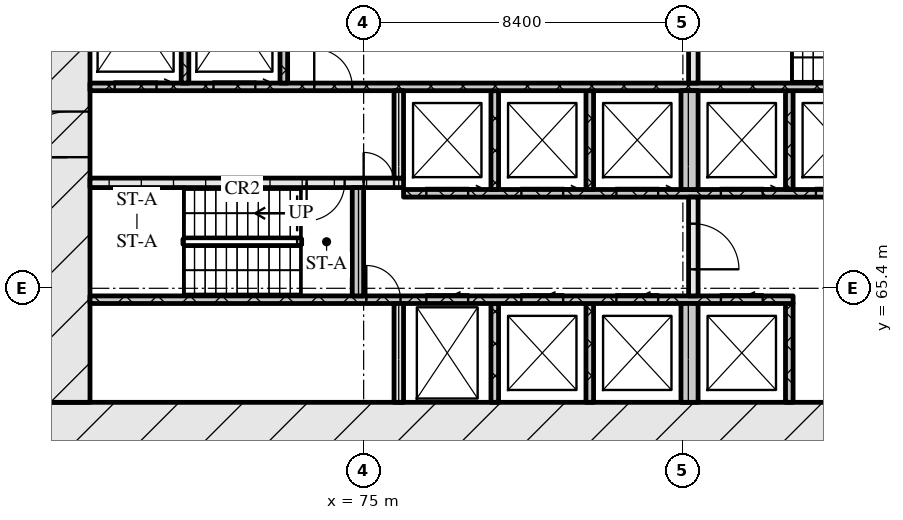
"""IFC4 building model, lengths in metres.
Left out: names, types, materials, properties, quantities, classifications, styles, units other than length and angle.
Written with IfcOpenShell. Run it as: python <this file> out.ifc"""

import sys

from ifc_helpers import new_model, si_unit, direction, frame, frame_2d, origin, place, context, subcontext, project, spatial, rectangle, extrude, element, fill, save


model = new_model("IFC4")
c1 = context("Model", 3, precision=1e-05, world=origin(), true_north=direction((0.0, 1.0)))
c2 = subcontext(c1, "Body", "Model", "MODEL_VIEW")
j1 = project(units=[si_unit("LENGTHUNIT", "METRE"), si_unit("PLANEANGLEUNIT", "RADIAN")], contexts=[c1])
p1 = place(None, origin())
s1 = spatial("IfcSite", under=j1, at=p1, CompositionType="ELEMENT")
p2 = place(p1, origin())
s2 = spatial("IfcBuilding", under=s1, at=p2, CompositionType="ELEMENT")
p3 = place(p2, origin())
s3 = spatial("IfcBuildingStorey", under=s2, at=p3, CompositionType="ELEMENT", Elevation=0.0)
p4 = place(p3, frame((66.6, 61.8, 0.0), z_axis=(0.0, 0.0, 1.0), x_axis=(1.0, 0.0, 0.0)))
e1 = element("IfcWall", 1, at=p4, inside=s3, PredefinedType="SOLIDWALL", context=c2, shape_type="SweptSolid", body=[
    extrude(rectangle(XDim=42.0, YDim=1.2, at=frame_2d((21.0, 0.0))), origin(), (0.0, 0.0, 1.0), 8.7),
])
p5 = place(p4, frame((21.35, 0.0, 0.0)))
e2 = element("IfcOpeningElement", 2, at=p5, cuts=e1, PredefinedType="OPENING", context=c2, shape_type="SweptSolid", body=[
    extrude(rectangle(XDim=1.8, YDim=2.1, at=frame_2d((0.9, 1.05))), frame((0.0, 0.61, 0.0), z_axis=(0.0, -1.0, 0.0), x_axis=(1.0, 0.0, 0.0)), (0.0, 0.0, 1.0), 1.22),
])
p6 = place(p3, frame((67.2, 62.4, 0.0), z_axis=(0.0, 0.0, 1.0), x_axis=(0.0, 1.0, 0.0)))
e3 = element("IfcWall", 3, at=p6, inside=s3, PredefinedType="SOLIDWALL", context=c2, shape_type="SweptSolid", body=[
    extrude(rectangle(XDim=12.0, YDim=1.2, at=frame_2d((6.0, 0.0))), origin(), (0.0, 0.0, 1.0), 8.7),
])
p7 = place(p6, frame((6.45, 0.0, 0.0)))
e4 = element("IfcOpeningElement", 4, at=p7, cuts=e3, PredefinedType="OPENING", context=c2, shape_type="SweptSolid", body=[
    extrude(rectangle(XDim=1.2, YDim=2.1, at=frame_2d((0.6, 1.05))), frame((0.0, 0.61, 0.0), z_axis=(0.0, -1.0, 0.0), x_axis=(1.0, 0.0, 0.0)), (0.0, 0.0, 1.0), 1.22),
])
p8 = place(p3, frame((75.925, 62.4, 0.0), z_axis=(0.0, 0.0, 1.0), x_axis=(0.0, 1.0, 0.0)))
e5 = element("IfcWall", 5, at=p8, inside=s3, PredefinedType="SOLIDWALL", context=c2, shape_type="SweptSolid", body=[
    extrude(rectangle(XDim=2.6, YDim=0.25, at=frame_2d((1.3, 0.0))), origin(), (0.0, 0.0, 1.0), 8.7),
])
for number, where, z_axis, x_axis in (
    (6, (78.45, 62.4, 0.0), (0.0, 0.0, 1.0), (0.0, 1.0, 0.0)),
    (7, (80.95, 62.4, 0.0), (0.0, 0.0, 1.0), (0.0, 1.0, 0.0)),
):
    element("IfcWall", number, at=place(p3, frame(where, z_axis=z_axis, x_axis=x_axis)), inside=s3, PredefinedType="SOLIDWALL", context=c2, shape_type="SweptSolid", body=[
        extrude(rectangle(XDim=2.6, YDim=0.2, at=frame_2d((1.3, 0.0))), origin(), (0.0, 0.0, 1.0), 8.7),
    ])
p9 = place(p3, frame((83.575, 62.4, 0.0), z_axis=(0.0, 0.0, 1.0), x_axis=(0.0, 1.0, 0.0)))
e8 = element("IfcWall", 8, at=p9, inside=s3, PredefinedType="SOLIDWALL", context=c2, shape_type="SweptSolid", body=[
    extrude(rectangle(XDim=2.6, YDim=0.45, at=frame_2d((1.3, 0.0))), origin(), (0.0, 0.0, 1.0), 8.7),
])
p10 = place(p3, frame((86.2, 62.4, 0.0), z_axis=(0.0, 0.0, 1.0), x_axis=(0.0, 1.0, 0.0)))
e9 = element("IfcWall", 9, at=p10, inside=s3, PredefinedType="SOLIDWALL", context=c2, shape_type="SweptSolid", body=[
    extrude(rectangle(XDim=2.6, YDim=0.2, at=frame_2d((1.3, 0.0))), origin(), (0.0, 0.0, 1.0), 8.7),
])
p11 = place(p3, frame((67.8, 65.1, 0.0), z_axis=(0.0, 0.0, 1.0), x_axis=(1.0, 0.0, 0.0)))
e10 = element("IfcWall", 10, at=p11, inside=s3, PredefinedType="SOLIDWALL", context=c2, shape_type="SweptSolid", body=[
    extrude(rectangle(XDim=18.5, YDim=0.2, at=frame_2d((9.25, 0.0))), origin(), (0.0, 0.0, 1.0), 8.7),
])
p12 = place(p11, frame((7.27, 0.0, 0.0)))
e11 = element("IfcOpeningElement", 11, at=p12, cuts=e10, PredefinedType="OPENING", context=c2, shape_type="SweptSolid", body=[
    extrude(rectangle(XDim=0.9, YDim=2.1, at=frame_2d((0.45, 1.05))), frame((0.0, 0.11, 0.0), z_axis=(0.0, -1.0, 0.0), x_axis=(1.0, 0.0, 0.0)), (0.0, 0.0, 1.0), 0.22),
])
p13 = place(p11, frame((8.85, 0.0, 0.0)))
e12 = element("IfcOpeningElement", 12, at=p13, cuts=e10, PredefinedType="OPENING", context=c2, shape_type="SweptSolid", body=[
    extrude(rectangle(XDim=1.1, YDim=2.1, at=frame_2d((0.55, 1.05))), frame((0.0, 0.11, 0.0), z_axis=(0.0, -1.0, 0.0), x_axis=(1.0, 0.0, 0.0)), (0.0, 0.0, 1.0), 0.22),
])
p14 = place(p11, frame((11.35, 0.0, 0.0)))
e13 = element("IfcOpeningElement", 13, at=p14, cuts=e10, PredefinedType="OPENING", context=c2, shape_type="SweptSolid", body=[
    extrude(rectangle(XDim=1.1, YDim=2.1, at=frame_2d((0.55, 1.05))), frame((0.0, 0.11, 0.0), z_axis=(0.0, -1.0, 0.0), x_axis=(1.0, 0.0, 0.0)), (0.0, 0.0, 1.0), 0.22),
])
p15 = place(p11, frame((13.85, 0.0, 0.0)))
e14 = element("IfcOpeningElement", 14, at=p15, cuts=e10, PredefinedType="OPENING", context=c2, shape_type="SweptSolid", body=[
    extrude(rectangle(XDim=1.1, YDim=2.1, at=frame_2d((0.55, 1.05))), frame((0.0, 0.11, 0.0), z_axis=(0.0, -1.0, 0.0), x_axis=(1.0, 0.0, 0.0)), (0.0, 0.0, 1.0), 0.22),
])
p16 = place(p11, frame((16.6, 0.0, 0.0)))
e15 = element("IfcOpeningElement", 15, at=p16, cuts=e10, PredefinedType="OPENING", context=c2, shape_type="SweptSolid", body=[
    extrude(rectangle(XDim=1.1, YDim=2.1, at=frame_2d((0.55, 1.05))), frame((0.0, 0.11, 0.0), z_axis=(0.0, -1.0, 0.0), x_axis=(1.0, 0.0, 0.0)), (0.0, 0.0, 1.0), 0.22),
])
p17 = place(p3, frame((74.85, 65.2, 0.0), z_axis=(0.0, 0.0, 1.0), x_axis=(0.0, 1.0, 0.0)))
e16 = element("IfcWall", 16, at=p17, inside=s3, PredefinedType="SOLIDWALL", context=c2, shape_type="SweptSolid", body=[
    extrude(rectangle(XDim=2.85, YDim=0.3, at=frame_2d((1.425, 0.0))), origin(), (0.0, 0.0, 1.0), 8.7),
])
p18 = place(p3, frame((83.675, 65.2, 0.0), z_axis=(0.0, 0.0, 1.0), x_axis=(0.0, 1.0, 0.0)))
e17 = element("IfcWall", 17, at=p18, inside=s3, PredefinedType="SOLIDWALL", context=c2, shape_type="SweptSolid", body=[
    extrude(rectangle(XDim=2.6, YDim=0.25, at=frame_2d((1.3, 0.0))), origin(), (0.0, 0.0, 1.0), 8.7),
])
p19 = place(p18, frame((0.7, 0.0, 0.0)))
e18 = element("IfcOpeningElement", 18, at=p19, cuts=e17, PredefinedType="OPENING", context=c2, shape_type="SweptSolid", body=[
    extrude(rectangle(XDim=1.2, YDim=2.1, at=frame_2d((0.6, 1.05))), frame((0.0, 0.135, 0.0), z_axis=(0.0, -1.0, 0.0), x_axis=(1.0, 0.0, 0.0)), (0.0, 0.0, 1.0), 0.27),
])
p20 = place(p3, frame((76.05, 67.9, 0.0), z_axis=(0.0, 0.0, 1.0), x_axis=(1.0, 0.0, 0.0)))
e19 = element("IfcWall", 19, at=p20, inside=s3, PredefinedType="SOLIDWALL", context=c2, shape_type="SweptSolid", body=[
    extrude(rectangle(XDim=23.1, YDim=0.2, at=frame_2d((11.55, 0.0))), origin(), (0.0, 0.0, 1.0), 8.7),
])
p21 = place(p20, frame((0.6, 0.0, 0.0)))
e20 = element("IfcOpeningElement", 20, at=p21, cuts=e19, PredefinedType="OPENING", context=c2, shape_type="SweptSolid", body=[
    extrude(rectangle(XDim=1.1, YDim=2.1, at=frame_2d((0.55, 1.05))), frame((0.0, 0.11, 0.0), z_axis=(0.0, -1.0, 0.0), x_axis=(1.0, 0.0, 0.0)), (0.0, 0.0, 1.0), 0.22),
])
p22 = place(p20, frame((3.1, 0.0, 0.0)))
e21 = element("IfcOpeningElement", 21, at=p22, cuts=e19, PredefinedType="OPENING", context=c2, shape_type="SweptSolid", body=[
    extrude(rectangle(XDim=1.1, YDim=2.1, at=frame_2d((0.55, 1.05))), frame((0.0, 0.11, 0.0), z_axis=(0.0, -1.0, 0.0), x_axis=(1.0, 0.0, 0.0)), (0.0, 0.0, 1.0), 0.22),
])
p23 = place(p20, frame((5.6, 0.0, 0.0)))
e22 = element("IfcOpeningElement", 22, at=p23, cuts=e19, PredefinedType="OPENING", context=c2, shape_type="SweptSolid", body=[
    extrude(rectangle(XDim=1.1, YDim=2.1, at=frame_2d((0.55, 1.05))), frame((0.0, 0.11, 0.0), z_axis=(0.0, -1.0, 0.0), x_axis=(1.0, 0.0, 0.0)), (0.0, 0.0, 1.0), 0.22),
])
p24 = place(p20, frame((8.35, 0.0, 0.0)))
e23 = element("IfcOpeningElement", 23, at=p24, cuts=e19, PredefinedType="OPENING", context=c2, shape_type="SweptSolid", body=[
    extrude(rectangle(XDim=1.1, YDim=2.1, at=frame_2d((0.55, 1.05))), frame((0.0, 0.11, 0.0), z_axis=(0.0, -1.0, 0.0), x_axis=(1.0, 0.0, 0.0)), (0.0, 0.0, 1.0), 0.22),
])
p25 = place(p20, frame((10.85, 0.0, 0.0)))
e24 = element("IfcOpeningElement", 24, at=p25, cuts=e19, PredefinedType="OPENING", context=c2, shape_type="SweptSolid", body=[
    extrude(rectangle(XDim=1.1, YDim=2.1, at=frame_2d((0.55, 1.05))), frame((0.0, 0.11, 0.0), z_axis=(0.0, -1.0, 0.0), x_axis=(1.0, 0.0, 0.0)), (0.0, 0.0, 1.0), 0.22),
])
p26 = place(p20, frame((13.55, 0.0, 0.0)))
e25 = element("IfcOpeningElement", 25, at=p26, cuts=e19, PredefinedType="OPENING", context=c2, shape_type="SweptSolid", body=[
    extrude(rectangle(XDim=1.0, YDim=2.1, at=frame_2d((0.5, 1.05))), frame((0.0, 0.11, 0.0), z_axis=(0.0, -1.0, 0.0), x_axis=(1.0, 0.0, 0.0)), (0.0, 0.0, 1.0), 0.22),
])
p27 = place(p20, frame((16.2, 0.0, 0.0)))
e26 = element("IfcOpeningElement", 26, at=p27, cuts=e19, PredefinedType="OPENING", context=c2, shape_type="SweptSolid", body=[
    extrude(rectangle(XDim=1.1, YDim=2.1, at=frame_2d((0.55, 1.05))), frame((0.0, 0.11, 0.0), z_axis=(0.0, -1.0, 0.0), x_axis=(1.0, 0.0, 0.0)), (0.0, 0.0, 1.0), 0.22),
])
p28 = place(p20, frame((18.7, 0.0, 0.0)))
e27 = element("IfcOpeningElement", 27, at=p28, cuts=e19, PredefinedType="OPENING", context=c2, shape_type="SweptSolid", body=[
    extrude(rectangle(XDim=1.1, YDim=2.1, at=frame_2d((0.55, 1.05))), frame((0.0, 0.11, 0.0), z_axis=(0.0, -1.0, 0.0), x_axis=(1.0, 0.0, 0.0)), (0.0, 0.0, 1.0), 0.22),
])
p29 = place(p20, frame((21.2, 0.0, 0.0)))
e28 = element("IfcOpeningElement", 28, at=p29, cuts=e19, PredefinedType="OPENING", context=c2, shape_type="SweptSolid", body=[
    extrude(rectangle(XDim=1.1, YDim=2.1, at=frame_2d((0.55, 1.05))), frame((0.0, 0.11, 0.0), z_axis=(0.0, -1.0, 0.0), x_axis=(1.0, 0.0, 0.0)), (0.0, 0.0, 1.0), 0.22),
])
for number, where, z_axis, x_axis in (
    (29, (78.45, 68.0, 0.0), (0.0, 0.0, 1.0), (0.0, 1.0, 0.0)),
    (30, (80.95, 68.0, 0.0), (0.0, 0.0, 1.0), (0.0, 1.0, 0.0)),
):
    element("IfcWall", number, at=place(p3, frame(where, z_axis=z_axis, x_axis=x_axis)), inside=s3, PredefinedType="SOLIDWALL", context=c2, shape_type="SweptSolid", body=[
        extrude(rectangle(XDim=2.6, YDim=0.2, at=frame_2d((1.3, 0.0))), origin(), (0.0, 0.0, 1.0), 8.7),
    ])
p30 = place(p3, frame((83.575, 68.0, 0.0), z_axis=(0.0, 0.0, 1.0), x_axis=(0.0, 1.0, 0.0)))
e31 = element("IfcWall", 31, at=p30, inside=s3, PredefinedType="SOLIDWALL", context=c2, shape_type="SweptSolid", body=[
    extrude(rectangle(XDim=2.6, YDim=0.45, at=frame_2d((1.3, 0.0))), origin(), (0.0, 0.0, 1.0), 8.7),
])
p31 = place(p3, frame((86.2, 68.0, 0.0), z_axis=(0.0, 0.0, 1.0), x_axis=(0.0, 1.0, 0.0)))
e32 = element("IfcWall", 32, at=p31, inside=s3, PredefinedType="SOLIDWALL", context=c2, shape_type="SweptSolid", body=[
    extrude(rectangle(XDim=2.6, YDim=0.2, at=frame_2d((1.3, 0.0))), origin(), (0.0, 0.0, 1.0), 8.7),
])
p32 = place(p3, frame((67.8, 68.175, 0.0), z_axis=(0.0, 0.0, 1.0), x_axis=(1.0, 0.0, 0.0)))
e33 = element("IfcWall", 33, at=p32, inside=s3, PredefinedType="SOLIDWALL", context=c2, shape_type="SweptSolid", body=[
    extrude(rectangle(XDim=8.25, YDim=0.25, at=frame_2d((4.125, 0.0))), origin(), (0.0, 0.0, 1.0), 8.7),
])
p33 = place(p32, frame((5.7, 0.0, 0.0)))
e34 = element("IfcOpeningElement", 34, at=p33, cuts=e33, PredefinedType="OPENING", context=c2, shape_type="SweptSolid", body=[
    extrude(rectangle(XDim=1.0, YDim=2.1, at=frame_2d((0.5, 1.05))), frame((0.0, 0.135, 0.0), z_axis=(0.0, -1.0, 0.0), x_axis=(1.0, 0.0, 0.0)), (0.0, 0.0, 1.0), 0.27),
])
p34 = place(p32, frame((7.2, 0.0, 0.0)))
e35 = element("IfcOpeningElement", 35, at=p34, cuts=e33, PredefinedType="OPENING", context=c2, shape_type="SweptSolid", body=[
    extrude(rectangle(XDim=0.8, YDim=2.1, at=frame_2d((0.4, 1.05))), frame((0.0, 0.135, 0.0), z_axis=(0.0, -1.0, 0.0), x_axis=(1.0, 0.0, 0.0)), (0.0, 0.0, 1.0), 0.27),
])
p35 = place(p3, frame((75.925, 68.3, 0.0), z_axis=(0.0, 0.0, 1.0), x_axis=(0.0, 1.0, 0.0)))
e36 = element("IfcWall", 36, at=p35, inside=s3, PredefinedType="SOLIDWALL", context=c2, shape_type="SweptSolid", body=[
    extrude(rectangle(XDim=2.3, YDim=0.25, at=frame_2d((1.15, 0.0))), origin(), (0.0, 0.0, 1.0), 8.7),
])
p36 = place(p3, frame((67.8, 70.7, 0.0), z_axis=(0.0, 0.0, 1.0), x_axis=(1.0, 0.0, 0.0)))
e37 = element("IfcWall", 37, at=p36, inside=s3, PredefinedType="SOLIDWALL", context=c2, shape_type="SweptSolid", body=[
    extrude(rectangle(XDim=39.6, YDim=0.2, at=frame_2d((19.8, 0.0))), origin(), (0.0, 0.0, 1.0), 8.7),
])
p37 = place(p36, frame((0.65, 0.0, 0.0)))
e38 = element("IfcOpeningElement", 38, at=p37, cuts=e37, PredefinedType="OPENING", context=c2, shape_type="SweptSolid", body=[
    extrude(rectangle(XDim=1.1, YDim=2.1, at=frame_2d((0.55, 1.05))), frame((0.0, 0.11, 0.0), z_axis=(0.0, -1.0, 0.0), x_axis=(1.0, 0.0, 0.0)), (0.0, 0.0, 1.0), 0.22),
])
p38 = place(p36, frame((3.25, 0.0, 0.0)))
e39 = element("IfcOpeningElement", 39, at=p38, cuts=e37, PredefinedType="OPENING", context=c2, shape_type="SweptSolid", body=[
    extrude(rectangle(XDim=1.1, YDim=2.1, at=frame_2d((0.55, 1.05))), frame((0.0, 0.11, 0.0), z_axis=(0.0, -1.0, 0.0), x_axis=(1.0, 0.0, 0.0)), (0.0, 0.0, 1.0), 0.22),
])
p39 = place(p36, frame((5.9, 0.0, 0.0)))
e40 = element("IfcOpeningElement", 40, at=p39, cuts=e37, PredefinedType="OPENING", context=c2, shape_type="SweptSolid", body=[
    extrude(rectangle(XDim=1.0, YDim=2.1, at=frame_2d((0.5, 1.05))), frame((0.0, 0.11, 0.0), z_axis=(0.0, -1.0, 0.0), x_axis=(1.0, 0.0, 0.0)), (0.0, 0.0, 1.0), 0.22),
])
p40 = place(p36, frame((21.7, 0.0, 0.0)))
e41 = element("IfcOpeningElement", 41, at=p40, cuts=e37, PredefinedType="OPENING", context=c2, shape_type="SweptSolid", body=[
    extrude(rectangle(XDim=1.0, YDim=2.1, at=frame_2d((0.5, 1.05))), frame((0.0, 0.11, 0.0), z_axis=(0.0, -1.0, 0.0), x_axis=(1.0, 0.0, 0.0)), (0.0, 0.0, 1.0), 0.22),
])
p41 = place(p36, frame((32.7, 0.0, 0.0)))
e42 = element("IfcOpeningElement", 42, at=p41, cuts=e37, PredefinedType="OPENING", context=c2, shape_type="SweptSolid", body=[
    extrude(rectangle(XDim=1.0, YDim=2.1, at=frame_2d((0.5, 1.05))), frame((0.0, 0.11, 0.0), z_axis=(0.0, -1.0, 0.0), x_axis=(1.0, 0.0, 0.0)), (0.0, 0.0, 1.0), 0.22),
])
p42 = place(p36, frame((35.25, 0.0, 0.0)))
e43 = element("IfcOpeningElement", 43, at=p42, cuts=e37, PredefinedType="OPENING", context=c2, shape_type="SweptSolid", body=[
    extrude(rectangle(XDim=1.1, YDim=2.1, at=frame_2d((0.55, 1.05))), frame((0.0, 0.11, 0.0), z_axis=(0.0, -1.0, 0.0), x_axis=(1.0, 0.0, 0.0)), (0.0, 0.0, 1.0), 0.22),
])
p43 = place(p36, frame((37.85, 0.0, 0.0)))
e44 = element("IfcOpeningElement", 44, at=p43, cuts=e37, PredefinedType="OPENING", context=c2, shape_type="SweptSolid", body=[
    extrude(rectangle(XDim=1.1, YDim=2.1, at=frame_2d((0.55, 1.05))), frame((0.0, 0.11, 0.0), z_axis=(0.0, -1.0, 0.0), x_axis=(1.0, 0.0, 0.0)), (0.0, 0.0, 1.0), 0.22),
])
p44 = place(p3, frame((70.3, 70.8, 0.0), z_axis=(0.0, 0.0, 1.0), x_axis=(0.0, 1.0, 0.0)))
e45 = element("IfcWall", 45, at=p44, inside=s3, PredefinedType="SOLIDWALL", context=c2, shape_type="SweptSolid", body=[
    extrude(rectangle(XDim=3.6, YDim=0.2, at=frame_2d((1.8, 0.0))), origin(), (0.0, 0.0, 1.0), 8.7),
])
p45 = place(p3, frame((72.9, 70.8, 0.0), z_axis=(0.0, 0.0, 1.0), x_axis=(0.0, 1.0, 0.0)))
e46 = element("IfcWall", 46, at=p45, inside=s3, PredefinedType="SOLIDWALL", context=c2, shape_type="SweptSolid", body=[
    extrude(rectangle(XDim=1.2, YDim=0.2, at=frame_2d((0.6, 0.0))), origin(), (0.0, 0.0, 1.0), 8.7),
])
p46 = place(p3, frame((83.675, 70.8, 0.0), z_axis=(0.0, 0.0, 1.0), x_axis=(0.0, 1.0, 0.0)))
e47 = element("IfcWall", 47, at=p46, inside=s3, PredefinedType="SOLIDWALL", context=c2, shape_type="SweptSolid", body=[
    extrude(rectangle(XDim=1.2, YDim=0.25, at=frame_2d((0.6, 0.0))), origin(), (0.0, 0.0, 1.0), 8.7),
])
p47 = place(p12, origin())
e48 = element("IfcDoor", 48, at=p47, inside=s3, OperationType="SINGLE_SWING_LEFT", PredefinedType="DOOR", context=c2, shape_type="SweptSolid", body=[
    extrude(rectangle(XDim=0.9, YDim=2.1, at=frame_2d((0.45, 1.05))), frame((0.0, 0.025, 0.0), z_axis=(0.0, -1.0, 0.0), x_axis=(1.0, 0.0, 0.0)), (0.0, 0.0, 1.0), 0.05),
])
fill(e11, e48)
p48 = place(p13, origin())
e49 = element("IfcDoor", 49, at=p48, inside=s3, OperationType="SLIDING_TO_LEFT", PredefinedType="DOOR", context=c2, shape_type="SweptSolid", body=[
    extrude(rectangle(XDim=1.1, YDim=2.1, at=frame_2d((0.55, 1.05))), frame((0.0, 0.025, 0.0), z_axis=(0.0, -1.0, 0.0), x_axis=(1.0, 0.0, 0.0)), (0.0, 0.0, 1.0), 0.05),
])
fill(e12, e49)
p49 = place(p14, origin())
e50 = element("IfcDoor", 50, at=p49, inside=s3, OperationType="SLIDING_TO_LEFT", PredefinedType="DOOR", context=c2, shape_type="SweptSolid", body=[
    extrude(rectangle(XDim=1.1, YDim=2.1, at=frame_2d((0.55, 1.05))), frame((0.0, 0.025, 0.0), z_axis=(0.0, -1.0, 0.0), x_axis=(1.0, 0.0, 0.0)), (0.0, 0.0, 1.0), 0.05),
])
fill(e13, e50)
p50 = place(p15, origin())
e51 = element("IfcDoor", 51, at=p50, inside=s3, OperationType="SLIDING_TO_LEFT", PredefinedType="DOOR", context=c2, shape_type="SweptSolid", body=[
    extrude(rectangle(XDim=1.1, YDim=2.1, at=frame_2d((0.55, 1.05))), frame((0.0, 0.025, 0.0), z_axis=(0.0, -1.0, 0.0), x_axis=(1.0, 0.0, 0.0)), (0.0, 0.0, 1.0), 0.05),
])
fill(e14, e51)
p51 = place(p16, origin())
e52 = element("IfcDoor", 52, at=p51, inside=s3, OperationType="SLIDING_TO_LEFT", PredefinedType="DOOR", context=c2, shape_type="SweptSolid", body=[
    extrude(rectangle(XDim=1.1, YDim=2.1, at=frame_2d((0.55, 1.05))), frame((0.0, 0.025, 0.0), z_axis=(0.0, -1.0, 0.0), x_axis=(1.0, 0.0, 0.0)), (0.0, 0.0, 1.0), 0.05),
])
fill(e15, e52)
p52 = place(p19, origin())
e53 = element("IfcDoor", 53, at=p52, inside=s3, OperationType="SINGLE_SWING_RIGHT", PredefinedType="DOOR", context=c2, shape_type="SweptSolid", body=[
    extrude(rectangle(XDim=1.2, YDim=2.1, at=frame_2d((0.6, 1.05))), frame((0.0, 0.025, 0.0), z_axis=(0.0, -1.0, 0.0), x_axis=(1.0, 0.0, 0.0)), (0.0, 0.0, 1.0), 0.05),
])
fill(e18, e53)
p53 = place(p21, origin())
e54 = element("IfcDoor", 54, at=p53, inside=s3, OperationType="SLIDING_TO_RIGHT", PredefinedType="DOOR", context=c2, shape_type="SweptSolid", body=[
    extrude(rectangle(XDim=1.1, YDim=2.1, at=frame_2d((0.55, 1.05))), frame((0.0, 0.025, 0.0), z_axis=(0.0, -1.0, 0.0), x_axis=(1.0, 0.0, 0.0)), (0.0, 0.0, 1.0), 0.05),
])
fill(e20, e54)
p54 = place(p22, origin())
e55 = element("IfcDoor", 55, at=p54, inside=s3, OperationType="SLIDING_TO_RIGHT", PredefinedType="DOOR", context=c2, shape_type="SweptSolid", body=[
    extrude(rectangle(XDim=1.1, YDim=2.1, at=frame_2d((0.55, 1.05))), frame((0.0, 0.025, 0.0), z_axis=(0.0, -1.0, 0.0), x_axis=(1.0, 0.0, 0.0)), (0.0, 0.0, 1.0), 0.05),
])
fill(e21, e55)
p55 = place(p23, origin())
e56 = element("IfcDoor", 56, at=p55, inside=s3, OperationType="SLIDING_TO_RIGHT", PredefinedType="DOOR", context=c2, shape_type="SweptSolid", body=[
    extrude(rectangle(XDim=1.1, YDim=2.1, at=frame_2d((0.55, 1.05))), frame((0.0, 0.025, 0.0), z_axis=(0.0, -1.0, 0.0), x_axis=(1.0, 0.0, 0.0)), (0.0, 0.0, 1.0), 0.05),
])
fill(e22, e56)
p56 = place(p24, origin())
e57 = element("IfcDoor", 57, at=p56, inside=s3, OperationType="SLIDING_TO_RIGHT", PredefinedType="DOOR", context=c2, shape_type="SweptSolid", body=[
    extrude(rectangle(XDim=1.1, YDim=2.1, at=frame_2d((0.55, 1.05))), frame((0.0, 0.025, 0.0), z_axis=(0.0, -1.0, 0.0), x_axis=(1.0, 0.0, 0.0)), (0.0, 0.0, 1.0), 0.05),
])
fill(e23, e57)
p57 = place(p25, origin())
e58 = element("IfcDoor", 58, at=p57, inside=s3, OperationType="SLIDING_TO_RIGHT", PredefinedType="DOOR", context=c2, shape_type="SweptSolid", body=[
    extrude(rectangle(XDim=1.1, YDim=2.1, at=frame_2d((0.55, 1.05))), frame((0.0, 0.025, 0.0), z_axis=(0.0, -1.0, 0.0), x_axis=(1.0, 0.0, 0.0)), (0.0, 0.0, 1.0), 0.05),
])
fill(e24, e58)
p58 = place(p33, origin())
e59 = element("IfcDoor", 59, at=p58, inside=s3, OperationType="SINGLE_SWING_RIGHT", PredefinedType="DOOR", context=c2, shape_type="SweptSolid", body=[
    extrude(rectangle(XDim=1.0, YDim=2.1, at=frame_2d((0.5, 1.05))), frame((0.0, 0.025, 0.0), z_axis=(0.0, -1.0, 0.0), x_axis=(1.0, 0.0, 0.0)), (0.0, 0.0, 1.0), 0.05),
])
fill(e34, e59)
p59 = place(p34, origin())
e60 = element("IfcDoor", 60, at=p59, inside=s3, OperationType="SINGLE_SWING_LEFT", PredefinedType="DOOR", context=c2, shape_type="SweptSolid", body=[
    extrude(rectangle(XDim=0.8, YDim=2.1, at=frame_2d((0.4, 1.05))), frame((0.0, 0.025, 0.0), z_axis=(0.0, -1.0, 0.0), x_axis=(1.0, 0.0, 0.0)), (0.0, 0.0, 1.0), 0.05),
])
fill(e35, e60)
p60 = place(p7, origin())
e61 = element("IfcDoor", 61, at=p60, inside=s3, OperationType="SINGLE_SWING_LEFT", PredefinedType="DOOR", context=c2, shape_type="SweptSolid", body=[
    extrude(rectangle(XDim=1.2, YDim=2.1, at=frame_2d((0.6, 1.05))), frame((0.0, 0.025, 0.0), z_axis=(0.0, -1.0, 0.0), x_axis=(1.0, 0.0, 0.0)), (0.0, 0.0, 1.0), 0.05),
])
fill(e4, e61)
p61 = place(p37, origin())
e62 = element("IfcDoor", 62, at=p61, inside=s3, OperationType="SLIDING_TO_RIGHT", PredefinedType="DOOR", context=c2, shape_type="SweptSolid", body=[
    extrude(rectangle(XDim=1.1, YDim=2.1, at=frame_2d((0.55, 1.05))), frame((0.0, 0.025, 0.0), z_axis=(0.0, -1.0, 0.0), x_axis=(1.0, 0.0, 0.0)), (0.0, 0.0, 1.0), 0.05),
])
fill(e38, e62)
p62 = place(p38, origin())
e63 = element("IfcDoor", 63, at=p62, inside=s3, OperationType="SLIDING_TO_RIGHT", PredefinedType="DOOR", context=c2, shape_type="SweptSolid", body=[
    extrude(rectangle(XDim=1.1, YDim=2.1, at=frame_2d((0.55, 1.05))), frame((0.0, 0.025, 0.0), z_axis=(0.0, -1.0, 0.0), x_axis=(1.0, 0.0, 0.0)), (0.0, 0.0, 1.0), 0.05),
])
fill(e39, e63)
p63 = place(p39, origin())
e64 = element("IfcDoor", 64, at=p63, inside=s3, OperationType="SINGLE_SWING_LEFT", PredefinedType="DOOR", context=c2, shape_type="SweptSolid", body=[
    extrude(rectangle(XDim=1.0, YDim=2.1, at=frame_2d((0.5, 1.05))), frame((0.0, 0.025, 0.0), z_axis=(0.0, -1.0, 0.0), x_axis=(1.0, 0.0, 0.0)), (0.0, 0.0, 1.0), 0.05),
])
fill(e40, e64)
save(model, sys.argv[1])
